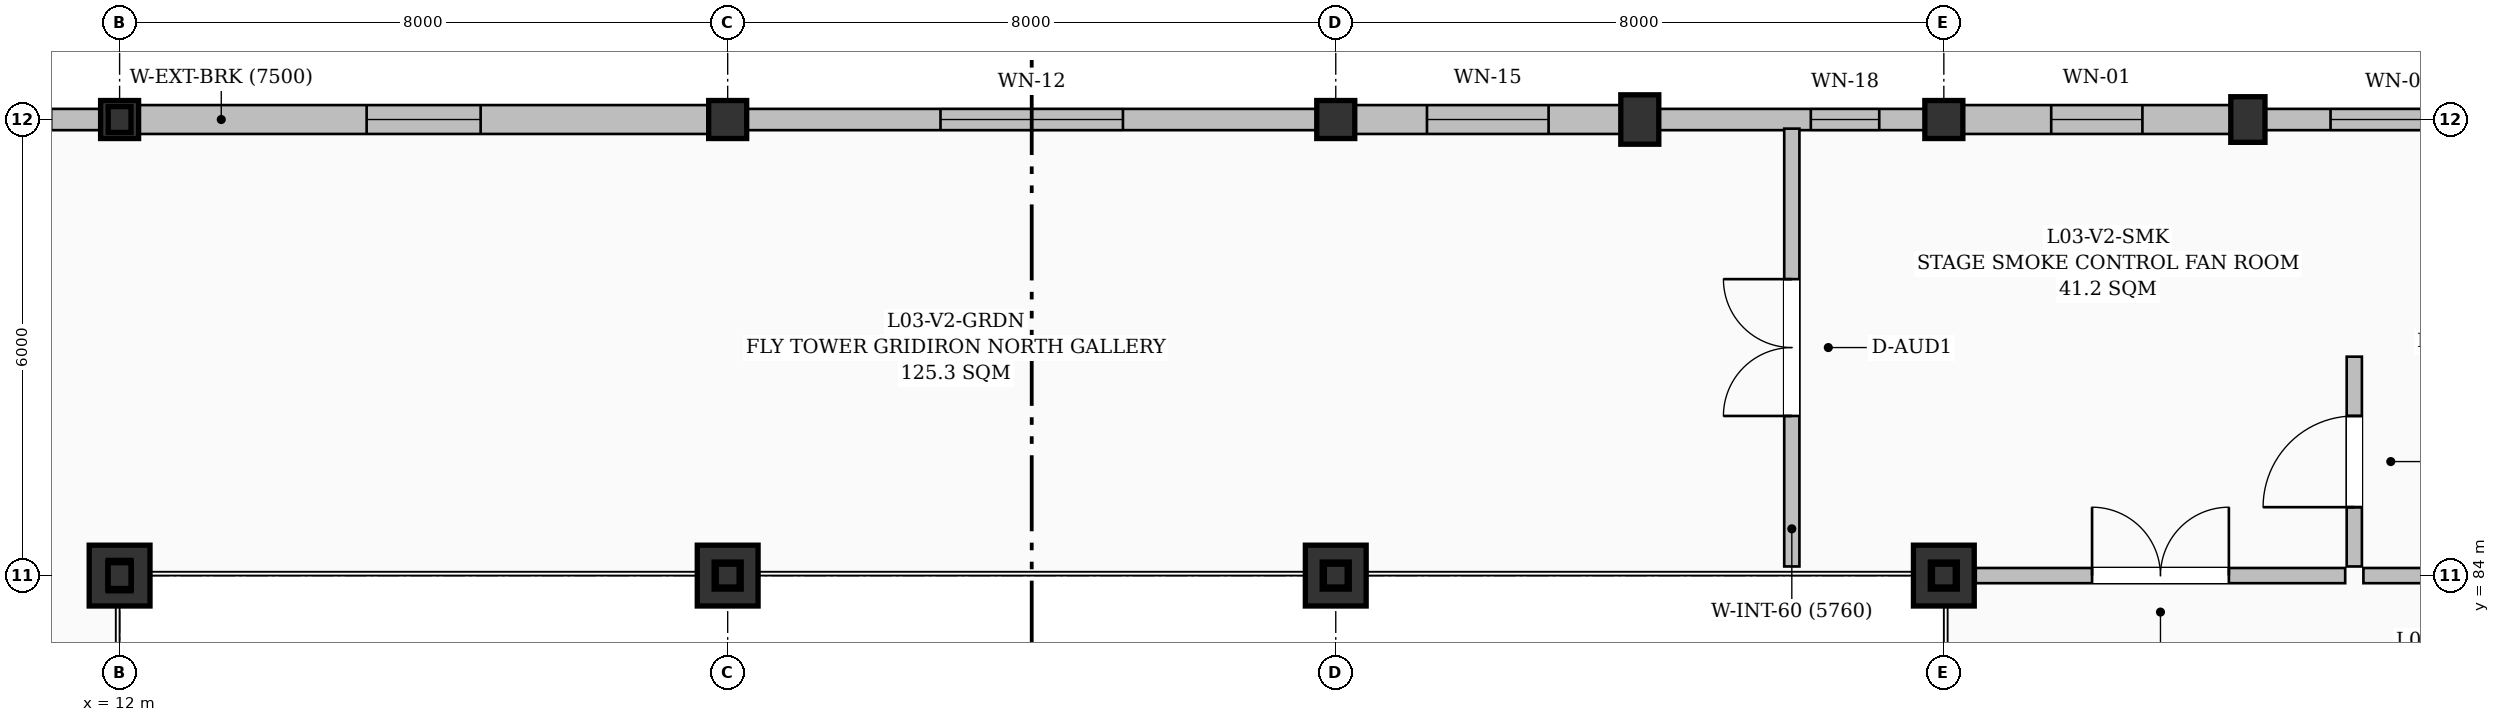
"""IFC4 building model, lengths in metres.
Left out: names, types, materials, properties, quantities, classifications, styles, units other than length and angle.
Written with IfcOpenShell. Run it as: python <this file> out.ifc"""

import sys

from ifc_helpers import new_model, si_unit, direction, frame, frame_2d, origin, origin_2d, place, context, subcontext, project, spatial, rectangle, hollow_rectangle, hollow_circle, i_section, extrude, element, fill, save


model = new_model("IFC4")
c1 = context("Model", 3, precision=1e-05, world=origin(), true_north=direction((0.0, 1.0)))
c2 = subcontext(c1, "Body", "Model", "MODEL_VIEW")
j1 = project(units=[si_unit("LENGTHUNIT", "METRE"), si_unit("PLANEANGLEUNIT", "RADIAN")], contexts=[c1])
p1 = place(None, origin())
s1 = spatial("IfcSite", under=j1, at=p1, CompositionType="ELEMENT")
p2 = place(p1, origin())
s2 = spatial("IfcBuilding", under=s1, at=p2, CompositionType="ELEMENT")
p3 = place(p2, frame((0.0, 0.0, 13.8)))
s3 = spatial("IfcBuildingStorey", under=s2, at=p3, CompositionType="ELEMENT", Elevation=13.8)
p4 = place(p3, frame((12.0, 84.0, 0.0), z_axis=(0.0, 0.0, 1.0), x_axis=(1.0, 0.0, 0.0)))
e1 = element("IfcColumn", 1, at=p4, inside=s3, PredefinedType="COLUMN", context=c2, shape_type="SweptSolid", body=[
    extrude(rectangle(XDim=0.8, YDim=0.8, at=origin_2d()), origin(), (0.0, 0.0, 1.0), 4.5),
])
p5 = place(p3, frame((12.0, 90.0, 0.0), z_axis=(0.0, 0.0, 1.0), x_axis=(1.0, 0.0, 0.0)))
e2 = element("IfcColumn", 2, at=p5, inside=s3, PredefinedType="COLUMN", context=c2, shape_type="SweptSolid", body=[
    extrude(rectangle(XDim=0.5, YDim=0.5, at=origin_2d()), origin(), (0.0, 0.0, 1.0), 4.5),
])
p6 = place(p3, frame((20.0, 84.0, 0.0), z_axis=(0.0, 0.0, 1.0), x_axis=(1.0, 0.0, 0.0)))
e3 = element("IfcColumn", 3, at=p6, inside=s3, PredefinedType="COLUMN", context=c2, shape_type="SweptSolid", body=[
    extrude(rectangle(XDim=0.8, YDim=0.8, at=origin_2d()), origin(), (0.0, 0.0, 1.0), 4.5),
])
p7 = place(p3, frame((20.0, 90.0, 0.0), z_axis=(0.0, 0.0, 1.0), x_axis=(1.0, 0.0, 0.0)))
e4 = element("IfcColumn", 4, at=p7, inside=s3, PredefinedType="COLUMN", context=c2, shape_type="SweptSolid", body=[
    extrude(rectangle(XDim=0.5, YDim=0.5, at=origin_2d()), origin(), (0.0, 0.0, 1.0), 4.5),
])
p8 = place(p3, frame((28.0, 84.0, 0.0), z_axis=(0.0, 0.0, 1.0), x_axis=(1.0, 0.0, 0.0)))
e5 = element("IfcColumn", 5, at=p8, inside=s3, PredefinedType="COLUMN", context=c2, shape_type="SweptSolid", body=[
    extrude(rectangle(XDim=0.8, YDim=0.8, at=origin_2d()), origin(), (0.0, 0.0, 1.0), 4.5),
])
p9 = place(p3, frame((28.0, 90.0, 0.0), z_axis=(0.0, 0.0, 1.0), x_axis=(1.0, 0.0, 0.0)))
e6 = element("IfcColumn", 6, at=p9, inside=s3, PredefinedType="COLUMN", context=c2, shape_type="SweptSolid", body=[
    extrude(rectangle(XDim=0.5, YDim=0.5, at=origin_2d()), origin(), (0.0, 0.0, 1.0), 4.5),
])
p10 = place(p3, frame((32.0, 90.0, 0.0), z_axis=(0.0, 0.0, 1.0), x_axis=(1.0, 0.0, 0.0)))
e7 = element("IfcColumn", 7, at=p10, inside=s3, PredefinedType="PILASTER", context=c2, shape_type="SweptSolid", body=[
    extrude(rectangle(XDim=0.5, YDim=0.65, at=origin_2d()), origin(), (0.0, 0.0, 1.0), 4.5),
])
p11 = place(p3, frame((36.0, 84.0, 0.0), z_axis=(0.0, 0.0, 1.0), x_axis=(1.0, 0.0, 0.0)))
e8 = element("IfcColumn", 8, at=p11, inside=s3, PredefinedType="COLUMN", context=c2, shape_type="SweptSolid", body=[
    extrude(rectangle(XDim=0.8, YDim=0.8, at=origin_2d()), origin(), (0.0, 0.0, 1.0), 4.5),
])
p12 = place(p3, frame((36.0, 90.0, 0.0), z_axis=(0.0, 0.0, 1.0), x_axis=(1.0, 0.0, 0.0)))
e9 = element("IfcColumn", 9, at=p12, inside=s3, PredefinedType="COLUMN", context=c2, shape_type="SweptSolid", body=[
    extrude(rectangle(XDim=0.5, YDim=0.5, at=origin_2d()), origin(), (0.0, 0.0, 1.0), 4.5),
])
p13 = place(p3, frame((40.0, 90.0, 0.0), z_axis=(0.0, 0.0, 1.0), x_axis=(1.0, 0.0, 0.0)))
e10 = element("IfcColumn", 10, at=p13, inside=s3, PredefinedType="PILASTER", context=c2, shape_type="SweptSolid", body=[
    extrude(rectangle(XDim=0.45, YDim=0.6, at=origin_2d()), origin(), (0.0, 0.0, 1.0), 4.5),
])
p14 = place(p3, frame((12.0, 84.0, 4.5), z_axis=(0.0, 0.0, 1.0), x_axis=(1.0, 0.0, 0.0)))
e11 = element("IfcColumn", 11, at=p14, inside=s3, PredefinedType="COLUMN", context=c2, shape_type="SweptSolid", body=[
    extrude(i_section(OverallWidth=0.3, OverallDepth=0.4, WebThickness=0.013, FlangeThickness=0.024, FilletRadius=0.027, at=origin_2d()), origin(), (0.0, 0.0, 1.0), 4.1),
])
p15 = place(p3, frame((12.0, 84.0, 8.6), z_axis=(0.0, 0.0, 1.0), x_axis=(1.0, 0.0, 0.0)))
e12 = element("IfcColumn", 12, at=p15, inside=s3, PredefinedType="COLUMN", context=c2, shape_type="SweptSolid", body=[
    extrude(i_section(OverallWidth=0.3, OverallDepth=0.36, WebThickness=0.012, FlangeThickness=0.022, FilletRadius=0.027, at=origin_2d()), origin(), (0.0, 0.0, 1.0), 4.1),
])
p16 = place(p3, frame((12.0, 84.0, 12.7), z_axis=(0.0, 0.0, 1.0), x_axis=(1.0, 0.0, 0.0)))
e13 = element("IfcColumn", 13, at=p16, inside=s3, PredefinedType="COLUMN", context=c2, shape_type="SweptSolid", body=[
    extrude(i_section(OverallWidth=0.3, OverallDepth=0.34, WebThickness=0.012, FlangeThickness=0.021, FilletRadius=0.027, at=origin_2d()), origin(), (0.0, 0.0, 1.0), 4.0),
])
p17 = place(p3, frame((20.0, 84.0, 4.5), z_axis=(0.0, 0.0, 1.0), x_axis=(1.0, 0.0, 0.0)))
e14 = element("IfcColumn", 14, at=p17, inside=s3, PredefinedType="COLUMN", context=c2, shape_type="SweptSolid", body=[
    extrude(hollow_circle(Radius=0.178, WallThickness=0.016, at=origin_2d()), origin(), (0.0, 0.0, 1.0), 4.1),
])
p18 = place(p3, frame((20.0, 84.0, 8.6), z_axis=(0.0, 0.0, 1.0), x_axis=(1.0, 0.0, 0.0)))
e15 = element("IfcColumn", 15, at=p18, inside=s3, PredefinedType="COLUMN", context=c2, shape_type="SweptSolid", body=[
    extrude(hollow_rectangle(XDim=0.25, YDim=0.25, WallThickness=0.012, InnerFilletRadius=0.019, OuterFilletRadius=0.031, at=origin_2d()), origin(), (0.0, 0.0, 1.0), 4.1),
])
p19 = place(p3, frame((20.0, 84.0, 12.7), z_axis=(0.0, 0.0, 1.0), x_axis=(1.0, 0.0, 0.0)))
e16 = element("IfcColumn", 16, at=p19, inside=s3, PredefinedType="COLUMN", context=c2, shape_type="SweptSolid", body=[
    extrude(i_section(OverallWidth=0.3, OverallDepth=0.3, WebThickness=0.011, FlangeThickness=0.019, FilletRadius=0.027, at=origin_2d()), origin(), (0.0, 0.0, 1.0), 4.0),
])
p20 = place(p3, frame((28.0, 84.0, 4.5), z_axis=(0.0, 0.0, 1.0), x_axis=(1.0, 0.0, 0.0)))
e17 = element("IfcColumn", 17, at=p20, inside=s3, PredefinedType="COLUMN", context=c2, shape_type="SweptSolid", body=[
    extrude(hollow_circle(Radius=0.178, WallThickness=0.016, at=origin_2d()), origin(), (0.0, 0.0, 1.0), 4.1),
])
p21 = place(p3, frame((28.0, 84.0, 8.6), z_axis=(0.0, 0.0, 1.0), x_axis=(1.0, 0.0, 0.0)))
e18 = element("IfcColumn", 18, at=p21, inside=s3, PredefinedType="COLUMN", context=c2, shape_type="SweptSolid", body=[
    extrude(hollow_rectangle(XDim=0.25, YDim=0.25, WallThickness=0.012, InnerFilletRadius=0.019, OuterFilletRadius=0.031, at=origin_2d()), origin(), (0.0, 0.0, 1.0), 4.1),
])
p22 = place(p3, frame((28.0, 84.0, 12.7), z_axis=(0.0, 0.0, 1.0), x_axis=(1.0, 0.0, 0.0)))
e19 = element("IfcColumn", 19, at=p22, inside=s3, PredefinedType="COLUMN", context=c2, shape_type="SweptSolid", body=[
    extrude(i_section(OverallWidth=0.3, OverallDepth=0.3, WebThickness=0.011, FlangeThickness=0.019, FilletRadius=0.027, at=origin_2d()), origin(), (0.0, 0.0, 1.0), 4.0),
])
p23 = place(p3, frame((36.0, 84.0, 4.5), z_axis=(0.0, 0.0, 1.0), x_axis=(1.0, 0.0, 0.0)))
e20 = element("IfcColumn", 20, at=p23, inside=s3, PredefinedType="COLUMN", context=c2, shape_type="SweptSolid", body=[
    extrude(hollow_circle(Radius=0.178, WallThickness=0.016, at=origin_2d()), origin(), (0.0, 0.0, 1.0), 4.1),
])
p24 = place(p3, frame((36.0, 84.0, 8.6), z_axis=(0.0, 0.0, 1.0), x_axis=(1.0, 0.0, 0.0)))
e21 = element("IfcColumn", 21, at=p24, inside=s3, PredefinedType="COLUMN", context=c2, shape_type="SweptSolid", body=[
    extrude(hollow_rectangle(XDim=0.25, YDim=0.25, WallThickness=0.012, InnerFilletRadius=0.019, OuterFilletRadius=0.031, at=origin_2d()), origin(), (0.0, 0.0, 1.0), 4.1),
])
p25 = place(p3, frame((36.0, 84.0, 12.7), z_axis=(0.0, 0.0, 1.0), x_axis=(1.0, 0.0, 0.0)))
e22 = element("IfcColumn", 22, at=p25, inside=s3, PredefinedType="COLUMN", context=c2, shape_type="SweptSolid", body=[
    extrude(i_section(OverallWidth=0.3, OverallDepth=0.3, WebThickness=0.011, FlangeThickness=0.019, FilletRadius=0.027, at=origin_2d()), origin(), (0.0, 0.0, 1.0), 4.0),
])
p26 = place(p3, frame((12.0, 84.0, 16.7), z_axis=(0.0, 0.0, 1.0), x_axis=(1.0, 0.0, 0.0)))
e23 = element("IfcColumn", 23, at=p26, inside=s3, PredefinedType="COLUMN", context=c2, shape_type="SweptSolid", body=[
    extrude(i_section(OverallWidth=0.3, OverallDepth=0.34, WebThickness=0.012, FlangeThickness=0.021, FilletRadius=0.027, at=origin_2d()), origin(), (0.0, 0.0, 1.0), 1.117),
])
p27 = place(p3, frame((12.0, 90.0, 4.5), z_axis=(0.0, 0.0, 1.0), x_axis=(1.0, 0.0, 0.0)))
e24 = element("IfcColumn", 24, at=p27, inside=s3, PredefinedType="COLUMN", context=c2, shape_type="SweptSolid", body=[
    extrude(i_section(OverallWidth=0.3, OverallDepth=0.34, WebThickness=0.012, FlangeThickness=0.021, FilletRadius=0.027, at=origin_2d()), origin(), (0.0, 0.0, 1.0), 1.244),
])
p28 = place(p3, frame((8.25, 90.0, 0.0), z_axis=(0.0, 0.0, 1.0), x_axis=(1.0, 0.0, 0.0)))
e25 = element("IfcWall", 25, at=p28, inside=s3, PredefinedType="SOLIDWALL", context=c2, shape_type="SweptSolid", body=[
    extrude(rectangle(XDim=3.5, YDim=0.28, at=frame_2d((1.75, 0.0))), origin(), (0.0, 0.0, 1.0), 4.125),
])
p29 = place(p28, frame((0.65, 0.0, 0.95)))
e26 = element("IfcOpeningElement", 26, at=p29, cuts=e25, PredefinedType="OPENING", context=c2, shape_type="SweptSolid", body=[
    extrude(rectangle(XDim=2.2, YDim=1.8, at=frame_2d((1.1, 0.9))), frame((0.0, 0.15, 0.0), z_axis=(0.0, -1.0, 0.0), x_axis=(1.0, 0.0, 0.0)), (0.0, 0.0, 1.0), 0.3),
])
p30 = place(p3, frame((12.25, 90.0, 0.0), z_axis=(0.0, 0.0, 1.0), x_axis=(1.0, 0.0, 0.0)))
e27 = element("IfcWall", 27, at=p30, inside=s3, PredefinedType="SOLIDWALL", context=c2, shape_type="SweptSolid", body=[
    extrude(rectangle(XDim=7.5, YDim=0.38, at=frame_2d((3.75, 0.0))), origin(), (0.0, 0.0, 1.0), 4.125),
])
p31 = place(p30, frame((3.0, 0.0, 0.95)))
e28 = element("IfcOpeningElement", 28, at=p31, cuts=e27, PredefinedType="OPENING", context=c2, shape_type="SweptSolid", body=[
    extrude(rectangle(XDim=1.5, YDim=1.5, at=frame_2d((0.75, 0.75))), frame((0.0, 0.2, 0.0), z_axis=(0.0, -1.0, 0.0), x_axis=(1.0, 0.0, 0.0)), (0.0, 0.0, 1.0), 0.4),
])
p32 = place(p3, frame((20.25, 90.0, 0.0), z_axis=(0.0, 0.0, 1.0), x_axis=(1.0, 0.0, 0.0)))
e29 = element("IfcWall", 29, at=p32, inside=s3, PredefinedType="SOLIDWALL", context=c2, shape_type="SweptSolid", body=[
    extrude(rectangle(XDim=7.5, YDim=0.28, at=frame_2d((3.75, 0.0))), origin(), (0.0, 0.0, 1.0), 4.125),
])
p33 = place(p32, frame((2.55, 0.0, 0.95)))
e30 = element("IfcOpeningElement", 30, at=p33, cuts=e29, PredefinedType="OPENING", context=c2, shape_type="SweptSolid", body=[
    extrude(rectangle(XDim=2.4, YDim=1.5, at=frame_2d((1.2, 0.75))), frame((0.0, 0.15, 0.0), z_axis=(0.0, -1.0, 0.0), x_axis=(1.0, 0.0, 0.0)), (0.0, 0.0, 1.0), 0.3),
])
p34 = place(p3, frame((28.25, 90.0, 0.0), z_axis=(0.0, 0.0, 1.0), x_axis=(1.0, 0.0, 0.0)))
e31 = element("IfcWall", 31, at=p34, inside=s3, PredefinedType="SOLIDWALL", context=c2, shape_type="SweptSolid", body=[
    extrude(rectangle(XDim=3.5, YDim=0.38, at=frame_2d((1.75, 0.0))), origin(), (0.0, 0.0, 1.0), 4.125),
])
p35 = place(p34, frame((0.95, 0.0, 0.95)))
e32 = element("IfcOpeningElement", 32, at=p35, cuts=e31, PredefinedType="OPENING", context=c2, shape_type="SweptSolid", body=[
    extrude(rectangle(XDim=1.6, YDim=1.2, at=frame_2d((0.8, 0.6))), frame((0.0, 0.2, 0.0), z_axis=(0.0, -1.0, 0.0), x_axis=(1.0, 0.0, 0.0)), (0.0, 0.0, 1.0), 0.4),
])
p36 = place(p3, frame((32.25, 90.0, 0.0), z_axis=(0.0, 0.0, 1.0), x_axis=(1.0, 0.0, 0.0)))
e33 = element("IfcWall", 33, at=p36, inside=s3, PredefinedType="SOLIDWALL", context=c2, shape_type="SweptSolid", body=[
    extrude(rectangle(XDim=3.5, YDim=0.28, at=frame_2d((1.75, 0.0))), origin(), (0.0, 0.0, 1.0), 4.125),
])
p37 = place(p36, frame((2.0, 0.0, 0.95)))
e34 = element("IfcOpeningElement", 34, at=p37, cuts=e33, PredefinedType="OPENING", context=c2, shape_type="SweptSolid", body=[
    extrude(rectangle(XDim=0.9, YDim=1.8, at=frame_2d((0.45, 0.9))), frame((0.0, 0.15, 0.0), z_axis=(0.0, -1.0, 0.0), x_axis=(1.0, 0.0, 0.0)), (0.0, 0.0, 1.0), 0.3),
])
p38 = place(p3, frame((36.25, 90.0, 0.0), z_axis=(0.0, 0.0, 1.0), x_axis=(1.0, 0.0, 0.0)))
e35 = element("IfcWall", 35, at=p38, inside=s3, PredefinedType="SOLIDWALL", context=c2, shape_type="SweptSolid", body=[
    extrude(rectangle(XDim=3.525, YDim=0.38, at=frame_2d((1.762, 0.0))), origin(), (0.0, 0.0, 1.0), 4.125),
])
p39 = place(p38, frame((1.163, 0.0, 0.95)))
e36 = element("IfcOpeningElement", 36, at=p39, cuts=e35, PredefinedType="OPENING", context=c2, shape_type="SweptSolid", body=[
    extrude(rectangle(XDim=1.2, YDim=1.8, at=frame_2d((0.6, 0.9))), frame((0.0, 0.2, 0.0), z_axis=(0.0, -1.0, 0.0), x_axis=(1.0, 0.0, 0.0)), (0.0, 0.0, 1.0), 0.4),
])
p40 = place(p3, frame((40.225, 90.0, 0.0), z_axis=(0.0, 0.0, 1.0), x_axis=(1.0, 0.0, 0.0)))
e37 = element("IfcWall", 37, at=p40, inside=s3, PredefinedType="SOLIDWALL", context=c2, shape_type="SweptSolid", body=[
    extrude(rectangle(XDim=3.525, YDim=0.28, at=frame_2d((1.762, 0.0))), origin(), (0.0, 0.0, 1.0), 4.125),
])
p41 = place(p40, frame((0.863, 0.0, 0.95)))
e38 = element("IfcOpeningElement", 38, at=p41, cuts=e37, PredefinedType="OPENING", context=c2, shape_type="SweptSolid", body=[
    extrude(rectangle(XDim=1.8, YDim=1.8, at=frame_2d((0.9, 0.9))), frame((0.0, 0.15, 0.0), z_axis=(0.0, -1.0, 0.0), x_axis=(1.0, 0.0, 0.0)), (0.0, 0.0, 1.0), 0.3),
])
p42 = place(p3, frame((34.0, 84.12, 0.0), z_axis=(0.0, 0.0, 1.0), x_axis=(0.0, 1.0, 0.0)))
e39 = element("IfcWall", 39, at=p42, inside=s3, PredefinedType="PARTITIONING", context=c2, shape_type="SweptSolid", body=[
    extrude(rectangle(XDim=5.76, YDim=0.2, at=frame_2d((2.88, 0.0))), origin(), (0.0, 0.0, 1.0), 4.25),
])
p43 = place(p42, frame((1.98, 0.0, 0.0)))
e40 = element("IfcOpeningElement", 40, at=p43, cuts=e39, PredefinedType="OPENING", context=c2, shape_type="SweptSolid", body=[
    extrude(rectangle(XDim=1.8, YDim=2.35, at=frame_2d((0.9, 1.175))), frame((0.0, 0.11, 0.0), z_axis=(0.0, -1.0, 0.0), x_axis=(1.0, 0.0, 0.0)), (0.0, 0.0, 1.0), 0.22),
])
p44 = place(p3, frame((41.4, 84.12, 0.0), z_axis=(0.0, 0.0, 1.0), x_axis=(0.0, 1.0, 0.0)))
e41 = element("IfcWall", 41, at=p44, inside=s3, PredefinedType="PARTITIONING", context=c2, shape_type="SweptSolid", body=[
    extrude(rectangle(XDim=2.76, YDim=0.2, at=frame_2d((1.38, 0.0))), origin(), (0.0, 0.0, 1.0), 4.25),
])
p45 = place(p44, frame((0.78, 0.0, 0.0)))
e42 = element("IfcOpeningElement", 42, at=p45, cuts=e41, PredefinedType="OPENING", context=c2, shape_type="SweptSolid", body=[
    extrude(rectangle(XDim=1.2, YDim=2.2, at=frame_2d((0.6, 1.1))), frame((0.0, 0.11, 0.0), z_axis=(0.0, -1.0, 0.0), x_axis=(1.0, 0.0, 0.0)), (0.0, 0.0, 1.0), 0.22),
])
p46 = place(p3, frame((36.42, 84.0, 0.0), z_axis=(0.0, 0.0, 1.0), x_axis=(1.0, 0.0, 0.0)))
e43 = element("IfcWall", 43, at=p46, inside=s3, PredefinedType="PARTITIONING", context=c2, shape_type="SweptSolid", body=[
    extrude(rectangle(XDim=4.86, YDim=0.2, at=frame_2d((2.43, 0.0))), origin(), (0.0, 0.0, 1.0), 4.125),
])
p47 = place(p46, frame((1.53, 0.0, 0.0)))
e44 = element("IfcOpeningElement", 44, at=p47, cuts=e43, PredefinedType="OPENING", context=c2, shape_type="SweptSolid", body=[
    extrude(rectangle(XDim=1.8, YDim=2.35, at=frame_2d((0.9, 1.175))), frame((0.0, 0.11, 0.0), z_axis=(0.0, -1.0, 0.0), x_axis=(1.0, 0.0, 0.0)), (0.0, 0.0, 1.0), 0.22),
])
p48 = place(p3, frame((41.52, 84.0, 0.0), z_axis=(0.0, 0.0, 1.0), x_axis=(1.0, 0.0, 0.0)))
e45 = element("IfcWall", 45, at=p48, inside=s3, PredefinedType="PARTITIONING", context=c2, shape_type="SweptSolid", body=[
    extrude(rectangle(XDim=2.06, YDim=0.2, at=frame_2d((1.03, 0.0))), origin(), (0.0, 0.0, 1.0), 4.125),
])
p49 = place(p31, origin())
e46 = element("IfcWindow", 46, at=p49, inside=s3, PartitioningType="DOUBLE_PANEL_VERTICAL", PredefinedType="WINDOW", context=c2, shape_type="SweptSolid", body=[
    extrude(rectangle(XDim=1.5, YDim=1.5, at=frame_2d((0.75, 0.75))), frame((0.0, 0.03, 0.0), z_axis=(0.0, -1.0, 0.0), x_axis=(1.0, 0.0, 0.0)), (0.0, 0.0, 1.0), 0.06),
])
fill(e28, e46)
p50 = place(p33, origin())
e47 = element("IfcWindow", 47, at=p50, inside=s3, PartitioningType="TRIPLE_PANEL_VERTICAL", PredefinedType="WINDOW", context=c2, shape_type="SweptSolid", body=[
    extrude(rectangle(XDim=2.4, YDim=1.5, at=frame_2d((1.2, 0.75))), frame((0.0, 0.03, 0.0), z_axis=(0.0, -1.0, 0.0), x_axis=(1.0, 0.0, 0.0)), (0.0, 0.0, 1.0), 0.06),
])
fill(e30, e47)
p51 = place(p35, origin())
e48 = element("IfcWindow", 48, at=p51, inside=s3, PartitioningType="DOUBLE_PANEL_HORIZONTAL", PredefinedType="WINDOW", context=c2, shape_type="SweptSolid", body=[
    extrude(rectangle(XDim=1.6, YDim=1.2, at=frame_2d((0.8, 0.6))), frame((0.0, 0.03, 0.0), z_axis=(0.0, -1.0, 0.0), x_axis=(1.0, 0.0, 0.0)), (0.0, 0.0, 1.0), 0.06),
])
fill(e32, e48)
p52 = place(p37, origin())
e49 = element("IfcWindow", 49, at=p52, inside=s3, PartitioningType="SINGLE_PANEL", PredefinedType="WINDOW", context=c2, shape_type="SweptSolid", body=[
    extrude(rectangle(XDim=0.9, YDim=1.8, at=frame_2d((0.45, 0.9))), frame((0.0, 0.03, 0.0), z_axis=(0.0, -1.0, 0.0), x_axis=(1.0, 0.0, 0.0)), (0.0, 0.0, 1.0), 0.06),
])
fill(e34, e49)
p53 = place(p39, origin())
e50 = element("IfcWindow", 50, at=p53, inside=s3, PartitioningType="SINGLE_PANEL", PredefinedType="WINDOW", context=c2, shape_type="SweptSolid", body=[
    extrude(rectangle(XDim=1.2, YDim=1.8, at=frame_2d((0.6, 0.9))), frame((0.0, 0.03, 0.0), z_axis=(0.0, -1.0, 0.0), x_axis=(1.0, 0.0, 0.0)), (0.0, 0.0, 1.0), 0.06),
])
fill(e36, e50)
p54 = place(p41, origin())
e51 = element("IfcWindow", 51, at=p54, inside=s3, PartitioningType="DOUBLE_PANEL_VERTICAL", PredefinedType="WINDOW", context=c2, shape_type="SweptSolid", body=[
    extrude(rectangle(XDim=1.8, YDim=1.8, at=frame_2d((0.9, 0.9))), frame((0.0, 0.03, 0.0), z_axis=(0.0, -1.0, 0.0), x_axis=(1.0, 0.0, 0.0)), (0.0, 0.0, 1.0), 0.06),
])
fill(e38, e51)
p55 = place(p43, origin())
e52 = element("IfcDoor", 52, at=p55, inside=s3, OperationType="DOUBLE_DOOR_SINGLE_SWING", PredefinedType="DOOR", context=c2, shape_type="SweptSolid", body=[
    extrude(rectangle(XDim=1.8, YDim=2.35, at=frame_2d((0.9, 1.175))), frame((0.0, 0.025, 0.0), z_axis=(0.0, -1.0, 0.0), x_axis=(1.0, 0.0, 0.0)), (0.0, 0.0, 1.0), 0.05),
])
fill(e40, e52)
p56 = place(p45, origin())
e53 = element("IfcDoor", 53, at=p56, inside=s3, OperationType="SINGLE_SWING_LEFT", PredefinedType="DOOR", context=c2, shape_type="SweptSolid", body=[
    extrude(rectangle(XDim=1.2, YDim=2.2, at=frame_2d((0.6, 1.1))), frame((0.0, 0.025, 0.0), z_axis=(0.0, -1.0, 0.0), x_axis=(1.0, 0.0, 0.0)), (0.0, 0.0, 1.0), 0.05),
])
fill(e42, e53)
p57 = place(p47, origin())
e54 = element("IfcDoor", 54, at=p57, inside=s3, OperationType="DOUBLE_DOOR_SINGLE_SWING", PredefinedType="DOOR", context=c2, shape_type="SweptSolid", body=[
    extrude(rectangle(XDim=1.8, YDim=2.35, at=frame_2d((0.9, 1.175))), frame((0.0, 0.025, 0.0), z_axis=(0.0, -1.0, 0.0), x_axis=(1.0, 0.0, 0.0)), (0.0, 0.0, 1.0), 0.05),
])
fill(e44, e54)
save(model, sys.argv[1])
